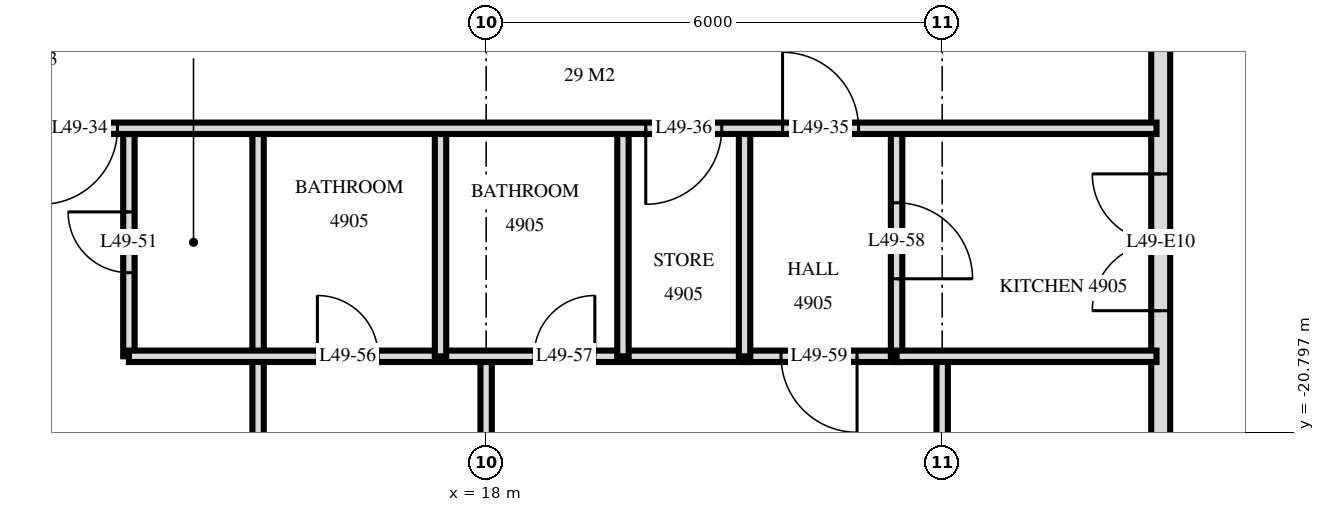
"""IFC4 building model, lengths in metres.
Left out: names, types, materials, properties, quantities, classifications, styles, units other than length and angle.
Written with IfcOpenShell. Run it as: python <this file> out.ifc"""

import sys

from ifc_helpers import new_model, si_unit, direction, frame, frame_2d, origin, place, context, subcontext, project, spatial, rectangle, extrude, element, fill, save


model = new_model("IFC4")
c1 = context("Model", 3, precision=1e-05, world=origin(), true_north=direction((0.0, 1.0)))
c2 = subcontext(c1, "Body", "Model", "MODEL_VIEW")
j1 = project(units=[si_unit("LENGTHUNIT", "METRE"), si_unit("PLANEANGLEUNIT", "RADIAN")], contexts=[c1])
p1 = place(None, origin())
s1 = spatial("IfcSite", under=j1, at=p1, CompositionType="ELEMENT")
p2 = place(p1, origin())
s2 = spatial("IfcBuilding", under=s1, at=p2, CompositionType="ELEMENT")
p3 = place(p2, frame((0.0, 0.0, 190.6)))
s3 = spatial("IfcBuildingStorey", under=s2, at=p3, CompositionType="ELEMENT", Elevation=190.6)
p4 = place(p3, frame((26.875, -24.875, 0.0), z_axis=(0.0, 0.0, 1.0), x_axis=(0.0, 1.0, 0.0)))
e1 = element("IfcWall", 1, at=p4, inside=s3, PredefinedType="SOLIDWALL", context=c2, shape_type="SweptSolid", body=[
    extrude(rectangle(XDim=21.551, YDim=0.25, at=frame_2d((10.775, 0.0))), origin(), (0.0, 0.0, 1.0), 3.22),
])
p5 = place(p4, frame((0.575, 0.0, 0.0)))
e2 = element("IfcOpeningElement", 2, at=p5, cuts=e1, PredefinedType="OPENING", context=c2, shape_type="SweptSolid", body=[
    extrude(rectangle(XDim=1.8, YDim=2.4, at=frame_2d((0.9, 1.2))), frame((0.0, 0.135, 0.0), z_axis=(0.0, -1.0, 0.0), x_axis=(1.0, 0.0, 0.0)), (0.0, 0.0, 1.0), 0.27),
])
p6 = place(p4, frame((5.675, 0.0, 0.0)))
e3 = element("IfcOpeningElement", 3, at=p6, cuts=e1, PredefinedType="OPENING", context=c2, shape_type="SweptSolid", body=[
    extrude(rectangle(XDim=1.8, YDim=2.4, at=frame_2d((0.9, 1.2))), frame((0.0, 0.135, 0.0), z_axis=(0.0, -1.0, 0.0), x_axis=(1.0, 0.0, 0.0)), (0.0, 0.0, 1.0), 0.27),
])
p7 = place(p4, frame((10.175, 0.0, 0.9)))
e4 = element("IfcOpeningElement", 4, at=p7, cuts=e1, PredefinedType="OPENING", context=c2, shape_type="SweptSolid", body=[
    extrude(rectangle(XDim=2.4, YDim=1.5, at=frame_2d((1.2, 0.75))), frame((0.0, 0.135, 0.0), z_axis=(0.0, -1.0, 0.0), x_axis=(1.0, 0.0, 0.0)), (0.0, 0.0, 1.0), 0.27),
])
p8 = place(p4, frame((13.475, 0.0, 0.0)))
e5 = element("IfcOpeningElement", 5, at=p8, cuts=e1, PredefinedType="OPENING", context=c2, shape_type="SweptSolid", body=[
    extrude(rectangle(XDim=1.8, YDim=2.4, at=frame_2d((0.9, 1.2))), frame((0.0, 0.135, 0.0), z_axis=(0.0, -1.0, 0.0), x_axis=(1.0, 0.0, 0.0)), (0.0, 0.0, 1.0), 0.27),
])
p9 = place(p3, frame((24.0, -28.918, 0.0), z_axis=(0.0, 0.0, 1.0), x_axis=(0.0, 1.0, 0.0)))
e6 = element("IfcWall", 6, at=p9, inside=s3, PredefinedType="PARTITIONING", context=c2, shape_type="SweptSolid", body=[
    extrude(rectangle(XDim=9.118, YDim=0.15, at=frame_2d((4.559, 0.0))), origin(), (0.0, 0.0, 1.0), 3.22),
])
p10 = place(p9, frame((3.998, 0.0, 0.0)))
e7 = element("IfcOpeningElement", 7, at=p10, cuts=e6, PredefinedType="OPENING", context=c2, shape_type="SweptSolid", body=[
    extrude(rectangle(XDim=0.9, YDim=2.1, at=frame_2d((0.45, 1.05))), frame((0.0, 0.085, 0.0), z_axis=(0.0, -1.0, 0.0), x_axis=(1.0, 0.0, 0.0)), (0.0, 0.0, 1.0), 0.17),
])
p11 = place(p3, frame((23.4, -19.8, 0.0), z_axis=(0.0, 0.0, 1.0), x_axis=(0.0, 1.0, 0.0)))
e8 = element("IfcWall", 8, at=p11, inside=s3, PredefinedType="PARTITIONING", context=c2, shape_type="SweptSolid", body=[
    extrude(rectangle(XDim=3.0, YDim=0.15, at=frame_2d((1.5, 0.0))), origin(), (0.0, 0.0, 1.0), 3.22),
])
p12 = place(p11, frame((1.02, 0.0, 0.0)))
e9 = element("IfcOpeningElement", 9, at=p12, cuts=e8, PredefinedType="OPENING", context=c2, shape_type="SweptSolid", body=[
    extrude(rectangle(XDim=1.0, YDim=2.1, at=frame_2d((0.5, 1.05))), frame((0.0, 0.085, 0.0), z_axis=(0.0, -1.0, 0.0), x_axis=(1.0, 0.0, 0.0)), (0.0, 0.0, 1.0), 0.17),
])
for number, where, z_axis, x_axis in (
    (10, (21.4, -19.8, 0.0), (0.0, 0.0, 1.0), (0.0, 1.0, 0.0)),
    (11, (19.8, -19.8, 0.0), (0.0, 0.0, 1.0), (0.0, 1.0, 0.0)),
):
    element("IfcWall", number, at=place(p3, frame(where, z_axis=z_axis, x_axis=x_axis)), inside=s3, PredefinedType="PARTITIONING", context=c2, shape_type="SweptSolid", body=[
        extrude(rectangle(XDim=3.0, YDim=0.15, at=frame_2d((1.5, 0.0))), origin(), (0.0, 0.0, 1.0), 3.22),
    ])
p13 = place(p3, frame((18.0, -29.22, 0.0), z_axis=(0.0, 0.0, 1.0), x_axis=(0.0, 1.0, 0.0)))
e12 = element("IfcWall", 12, at=p13, inside=s3, PredefinedType="PARTITIONING", context=c2, shape_type="SweptSolid", body=[
    extrude(rectangle(XDim=9.42, YDim=0.15, at=frame_2d((4.71, 0.0))), origin(), (0.0, 0.0, 1.0), 3.22),
])
p14 = place(p13, frame((4.19, 0.0, 0.0)))
e13 = element("IfcOpeningElement", 13, at=p14, cuts=e12, PredefinedType="OPENING", context=c2, shape_type="SweptSolid", body=[
    extrude(rectangle(XDim=0.9, YDim=2.1, at=frame_2d((0.45, 1.05))), frame((0.0, 0.085, 0.0), z_axis=(0.0, -1.0, 0.0), x_axis=(1.0, 0.0, 0.0)), (0.0, 0.0, 1.0), 0.17),
])
p15 = place(p3, frame((17.4, -19.8, 0.0), z_axis=(0.0, 0.0, 1.0), x_axis=(0.0, 1.0, 0.0)))
e14 = element("IfcWall", 14, at=p15, inside=s3, PredefinedType="PARTITIONING", context=c2, shape_type="SweptSolid", body=[
    extrude(rectangle(XDim=3.0, YDim=0.15, at=frame_2d((1.5, 0.0))), origin(), (0.0, 0.0, 1.0), 3.22),
])
p16 = place(p3, frame((15.0, -29.22, 0.0), z_axis=(0.0, 0.0, 1.0), x_axis=(0.0, 1.0, 0.0)))
e15 = element("IfcWall", 15, at=p16, inside=s3, PredefinedType="PARTITIONING", context=c2, shape_type="SweptSolid", body=[
    extrude(rectangle(XDim=12.42, YDim=0.15, at=frame_2d((6.21, 0.0))), origin(), (0.0, 0.0, 1.0), 3.22),
])
p17 = place(p3, frame((13.3, -19.8, 0.0), z_axis=(0.0, 0.0, 1.0), x_axis=(0.0, 1.0, 0.0)))
e16 = element("IfcWall", 16, at=p17, inside=s3, PredefinedType="PARTITIONING", context=c2, shape_type="SweptSolid", body=[
    extrude(rectangle(XDim=3.0, YDim=0.15, at=frame_2d((1.5, 0.0))), origin(), (0.0, 0.0, 1.0), 3.22),
])
p18 = place(p17, frame((1.1, 0.0, 0.0)))
e17 = element("IfcOpeningElement", 17, at=p18, cuts=e16, PredefinedType="OPENING", context=c2, shape_type="SweptSolid", body=[
    extrude(rectangle(XDim=0.8, YDim=2.1, at=frame_2d((0.4, 1.05))), frame((0.0, 0.085, 0.0), z_axis=(0.0, -1.0, 0.0), x_axis=(1.0, 0.0, 0.0)), (0.0, 0.0, 1.0), 0.17),
])
p19 = place(p3, frame((21.4, -19.8, 0.0), z_axis=(0.0, 0.0, 1.0), x_axis=(1.0, 0.0, 0.0)))
e18 = element("IfcWall", 18, at=p19, inside=s3, PredefinedType="PARTITIONING", context=c2, shape_type="SweptSolid", body=[
    extrude(rectangle(XDim=2.0, YDim=0.15, at=frame_2d((1.0, 0.0))), origin(), (0.0, 0.0, 1.0), 3.22),
])
p20 = place(p19, frame((0.48, 0.0, 0.0)))
e19 = element("IfcOpeningElement", 19, at=p20, cuts=e18, PredefinedType="OPENING", context=c2, shape_type="SweptSolid", body=[
    extrude(rectangle(XDim=1.0, YDim=2.1, at=frame_2d((0.5, 1.05))), frame((0.0, 0.085, 0.0), z_axis=(0.0, -1.0, 0.0), x_axis=(1.0, 0.0, 0.0)), (0.0, 0.0, 1.0), 0.17),
])
p21 = place(p3, frame((13.3, -19.8, 0.0), z_axis=(0.0, 0.0, 1.0), x_axis=(1.0, 0.0, 0.0)))
e20 = element("IfcWall", 20, at=p21, inside=s3, PredefinedType="PARTITIONING", context=c2, shape_type="SweptSolid", body=[
    extrude(rectangle(XDim=8.1, YDim=0.15, at=frame_2d((4.05, 0.0))), origin(), (0.0, 0.0, 1.0), 3.22),
])
p22 = place(p21, frame((2.48, 0.0, 0.0)))
e21 = element("IfcOpeningElement", 21, at=p22, cuts=e20, PredefinedType="OPENING", context=c2, shape_type="SweptSolid", body=[
    extrude(rectangle(XDim=0.8, YDim=2.1, at=frame_2d((0.4, 1.05))), frame((0.0, 0.085, 0.0), z_axis=(0.0, -1.0, 0.0), x_axis=(1.0, 0.0, 0.0)), (0.0, 0.0, 1.0), 0.17),
])
p23 = place(p21, frame((5.33, 0.0, 0.0)))
e22 = element("IfcOpeningElement", 22, at=p23, cuts=e20, PredefinedType="OPENING", context=c2, shape_type="SweptSolid", body=[
    extrude(rectangle(XDim=0.8, YDim=2.1, at=frame_2d((0.4, 1.05))), frame((0.0, 0.085, 0.0), z_axis=(0.0, -1.0, 0.0), x_axis=(1.0, 0.0, 0.0)), (0.0, 0.0, 1.0), 0.17),
])
p24 = place(p3, frame((23.4, -19.8, 0.0), z_axis=(0.0, 0.0, 1.0), x_axis=(1.0, 0.0, 0.0)))
e23 = element("IfcWall", 23, at=p24, inside=s3, PredefinedType="PARTITIONING", context=c2, shape_type="SweptSolid", body=[
    extrude(rectangle(XDim=3.42, YDim=0.15, at=frame_2d((1.71, 0.0))), origin(), (0.0, 0.0, 1.0), 3.22),
])
p25 = place(p3, frame((-26.82, -16.8, 0.0), z_axis=(0.0, 0.0, 1.0), x_axis=(1.0, 0.0, 0.0)))
e24 = element("IfcWall", 24, at=p25, inside=s3, PredefinedType="PARTITIONING", context=c2, shape_type="SweptSolid", body=[
    extrude(rectangle(XDim=53.64, YDim=0.15, at=frame_2d((26.82, 0.0))), origin(), (0.0, 0.0, 1.0), 3.22),
])
p26 = place(p25, frame((11.97, 0.0, 0.0)))
e25 = element("IfcOpeningElement", 25, at=p26, cuts=e24, PredefinedType="OPENING", context=c2, shape_type="SweptSolid", body=[
    extrude(rectangle(XDim=1.0, YDim=2.1, at=frame_2d((0.5, 1.05))), frame((0.0, 0.085, 0.0), z_axis=(0.0, -1.0, 0.0), x_axis=(1.0, 0.0, 0.0)), (0.0, 0.0, 1.0), 0.17),
])
p27 = place(p25, frame((10.67, 0.0, 0.0)))
e26 = element("IfcOpeningElement", 26, at=p27, cuts=e24, PredefinedType="OPENING", context=c2, shape_type="SweptSolid", body=[
    extrude(rectangle(XDim=1.0, YDim=2.1, at=frame_2d((0.5, 1.05))), frame((0.0, 0.085, 0.0), z_axis=(0.0, -1.0, 0.0), x_axis=(1.0, 0.0, 0.0)), (0.0, 0.0, 1.0), 0.17),
])
p28 = place(p25, frame((3.22, 0.0, 0.0)))
e27 = element("IfcOpeningElement", 27, at=p28, cuts=e24, PredefinedType="OPENING", context=c2, shape_type="SweptSolid", body=[
    extrude(rectangle(XDim=1.0, YDim=2.1, at=frame_2d((0.5, 1.05))), frame((0.0, 0.085, 0.0), z_axis=(0.0, -1.0, 0.0), x_axis=(1.0, 0.0, 0.0)), (0.0, 0.0, 1.0), 0.17),
])
p29 = place(p25, frame((5.02, 0.0, 0.0)))
e28 = element("IfcOpeningElement", 28, at=p29, cuts=e24, PredefinedType="OPENING", context=c2, shape_type="SweptSolid", body=[
    extrude(rectangle(XDim=1.0, YDim=2.1, at=frame_2d((0.5, 1.05))), frame((0.0, 0.085, 0.0), z_axis=(0.0, -1.0, 0.0), x_axis=(1.0, 0.0, 0.0)), (0.0, 0.0, 1.0), 0.17),
])
p30 = place(p25, frame((38.97, 0.0, 0.0)))
e29 = element("IfcOpeningElement", 29, at=p30, cuts=e24, PredefinedType="OPENING", context=c2, shape_type="SweptSolid", body=[
    extrude(rectangle(XDim=1.0, YDim=2.1, at=frame_2d((0.5, 1.05))), frame((0.0, 0.085, 0.0), z_axis=(0.0, -1.0, 0.0), x_axis=(1.0, 0.0, 0.0)), (0.0, 0.0, 1.0), 0.17),
])
p31 = place(p25, frame((48.72, 0.0, 0.0)))
e30 = element("IfcOpeningElement", 30, at=p31, cuts=e24, PredefinedType="OPENING", context=c2, shape_type="SweptSolid", body=[
    extrude(rectangle(XDim=1.0, YDim=2.1, at=frame_2d((0.5, 1.05))), frame((0.0, 0.085, 0.0), z_axis=(0.0, -1.0, 0.0), x_axis=(1.0, 0.0, 0.0)), (0.0, 0.0, 1.0), 0.17),
])
p32 = place(p25, frame((46.92, 0.0, 0.0)))
e31 = element("IfcOpeningElement", 31, at=p32, cuts=e24, PredefinedType="OPENING", context=c2, shape_type="SweptSolid", body=[
    extrude(rectangle(XDim=1.0, YDim=2.1, at=frame_2d((0.5, 1.05))), frame((0.0, 0.085, 0.0), z_axis=(0.0, -1.0, 0.0), x_axis=(1.0, 0.0, 0.0)), (0.0, 0.0, 1.0), 0.17),
])
p33 = place(p25, frame((18.32, 0.0, 0.0)))
e32 = element("IfcOpeningElement", 32, at=p33, cuts=e24, PredefinedType="OPENING", context=c2, shape_type="SweptSolid", body=[
    extrude(rectangle(XDim=1.0, YDim=2.1, at=frame_2d((0.5, 1.05))), frame((0.0, 0.085, 0.0), z_axis=(0.0, -1.0, 0.0), x_axis=(1.0, 0.0, 0.0)), (0.0, 0.0, 1.0), 0.17),
])
p34 = place(p25, frame((26.32, 0.0, 0.0)))
e33 = element("IfcOpeningElement", 33, at=p34, cuts=e24, PredefinedType="OPENING", context=c2, shape_type="SweptSolid", body=[
    extrude(rectangle(XDim=1.0, YDim=2.1, at=frame_2d((0.5, 1.05))), frame((0.0, 0.085, 0.0), z_axis=(0.0, -1.0, 0.0), x_axis=(1.0, 0.0, 0.0)), (0.0, 0.0, 1.0), 0.17),
])
p35 = place(p25, frame((34.32, 0.0, 0.0)))
e34 = element("IfcOpeningElement", 34, at=p35, cuts=e24, PredefinedType="OPENING", context=c2, shape_type="SweptSolid", body=[
    extrude(rectangle(XDim=1.0, YDim=2.1, at=frame_2d((0.5, 1.05))), frame((0.0, 0.085, 0.0), z_axis=(0.0, -1.0, 0.0), x_axis=(1.0, 0.0, 0.0)), (0.0, 0.0, 1.0), 0.17),
])
p36 = place(p6, origin())
e35 = element("IfcDoor", 35, at=p36, inside=s3, OperationType="DOUBLE_DOOR_SINGLE_SWING", PredefinedType="DOOR", context=c2, shape_type="SweptSolid", body=[
    extrude(rectangle(XDim=1.8, YDim=2.4, at=frame_2d((0.9, 1.2))), frame((0.0, 0.025, 0.0), z_axis=(0.0, -1.0, 0.0), x_axis=(1.0, 0.0, 0.0)), (0.0, 0.0, 1.0), 0.05),
])
fill(e3, e35)
p37 = place(p30, frame((0.5, 0.0, 0.0), z_axis=(0.0, 0.0, 1.0), x_axis=(-1.0, 0.0, 0.0)))
e36 = element("IfcDoor", 36, at=p37, inside=s3, OperationType="SINGLE_SWING_LEFT", PredefinedType="DOOR", context=c2, shape_type="SweptSolid", body=[
    extrude(rectangle(XDim=1.0, YDim=2.1, at=frame_2d((0.0, 1.05))), frame((0.0, -0.025, 0.0), z_axis=(0.0, 1.0, 0.0), x_axis=(-1.0, 0.0, 0.0)), (0.0, 0.0, 1.0), 0.05),
])
fill(e29, e36)
p38 = place(p31, origin())
e37 = element("IfcDoor", 37, at=p38, inside=s3, OperationType="SINGLE_SWING_RIGHT", PredefinedType="DOOR", context=c2, shape_type="SweptSolid", body=[
    extrude(rectangle(XDim=1.0, YDim=2.1, at=frame_2d((0.5, 1.05))), frame((0.0, 0.025, 0.0), z_axis=(0.0, -1.0, 0.0), x_axis=(1.0, 0.0, 0.0)), (0.0, 0.0, 1.0), 0.05),
])
fill(e30, e37)
p39 = place(p32, frame((0.5, 0.0, 0.0), z_axis=(0.0, 0.0, 1.0), x_axis=(-1.0, 0.0, 0.0)))
e38 = element("IfcDoor", 38, at=p39, inside=s3, OperationType="SINGLE_SWING_LEFT", PredefinedType="DOOR", context=c2, shape_type="SweptSolid", body=[
    extrude(rectangle(XDim=1.0, YDim=2.1, at=frame_2d((0.0, 1.05))), frame((0.0, -0.025, 0.0), z_axis=(0.0, 1.0, 0.0), x_axis=(-1.0, 0.0, 0.0)), (0.0, 0.0, 1.0), 0.05),
])
fill(e31, e38)
p40 = place(p18, origin())
e39 = element("IfcDoor", 39, at=p40, inside=s3, OperationType="SINGLE_SWING_LEFT", PredefinedType="DOOR", context=c2, shape_type="SweptSolid", body=[
    extrude(rectangle(XDim=0.8, YDim=2.1, at=frame_2d((0.4, 1.05))), frame((0.0, 0.025, 0.0), z_axis=(0.0, -1.0, 0.0), x_axis=(1.0, 0.0, 0.0)), (0.0, 0.0, 1.0), 0.05),
])
fill(e17, e39)
p41 = place(p22, origin())
e40 = element("IfcDoor", 40, at=p41, inside=s3, OperationType="SINGLE_SWING_RIGHT", PredefinedType="DOOR", context=c2, shape_type="SweptSolid", body=[
    extrude(rectangle(XDim=0.8, YDim=2.1, at=frame_2d((0.4, 1.05))), frame((0.0, 0.025, 0.0), z_axis=(0.0, -1.0, 0.0), x_axis=(1.0, 0.0, 0.0)), (0.0, 0.0, 1.0), 0.05),
])
fill(e21, e40)
p42 = place(p23, origin())
e41 = element("IfcDoor", 41, at=p42, inside=s3, OperationType="SINGLE_SWING_LEFT", PredefinedType="DOOR", context=c2, shape_type="SweptSolid", body=[
    extrude(rectangle(XDim=0.8, YDim=2.1, at=frame_2d((0.4, 1.05))), frame((0.0, 0.025, 0.0), z_axis=(0.0, -1.0, 0.0), x_axis=(1.0, 0.0, 0.0)), (0.0, 0.0, 1.0), 0.05),
])
fill(e22, e41)
p43 = place(p12, frame((0.5, 0.0, 0.0), z_axis=(0.0, 0.0, 1.0), x_axis=(-1.0, 0.0, 0.0)))
e42 = element("IfcDoor", 42, at=p43, inside=s3, OperationType="SINGLE_SWING_LEFT", PredefinedType="DOOR", context=c2, shape_type="SweptSolid", body=[
    extrude(rectangle(XDim=1.0, YDim=2.1, at=frame_2d((0.0, 1.05))), frame((0.0, -0.025, 0.0), z_axis=(0.0, 1.0, 0.0), x_axis=(-1.0, 0.0, 0.0)), (0.0, 0.0, 1.0), 0.05),
])
fill(e9, e42)
p44 = place(p20, frame((0.5, 0.0, 0.0), z_axis=(0.0, 0.0, 1.0), x_axis=(-1.0, 0.0, 0.0)))
e43 = element("IfcDoor", 43, at=p44, inside=s3, OperationType="SINGLE_SWING_RIGHT", PredefinedType="DOOR", context=c2, shape_type="SweptSolid", body=[
    extrude(rectangle(XDim=1.0, YDim=2.1, at=frame_2d((0.0, 1.05))), frame((0.0, -0.025, 0.0), z_axis=(0.0, 1.0, 0.0), x_axis=(-1.0, 0.0, 0.0)), (0.0, 0.0, 1.0), 0.05),
])
fill(e19, e43)
save(model, sys.argv[1])
